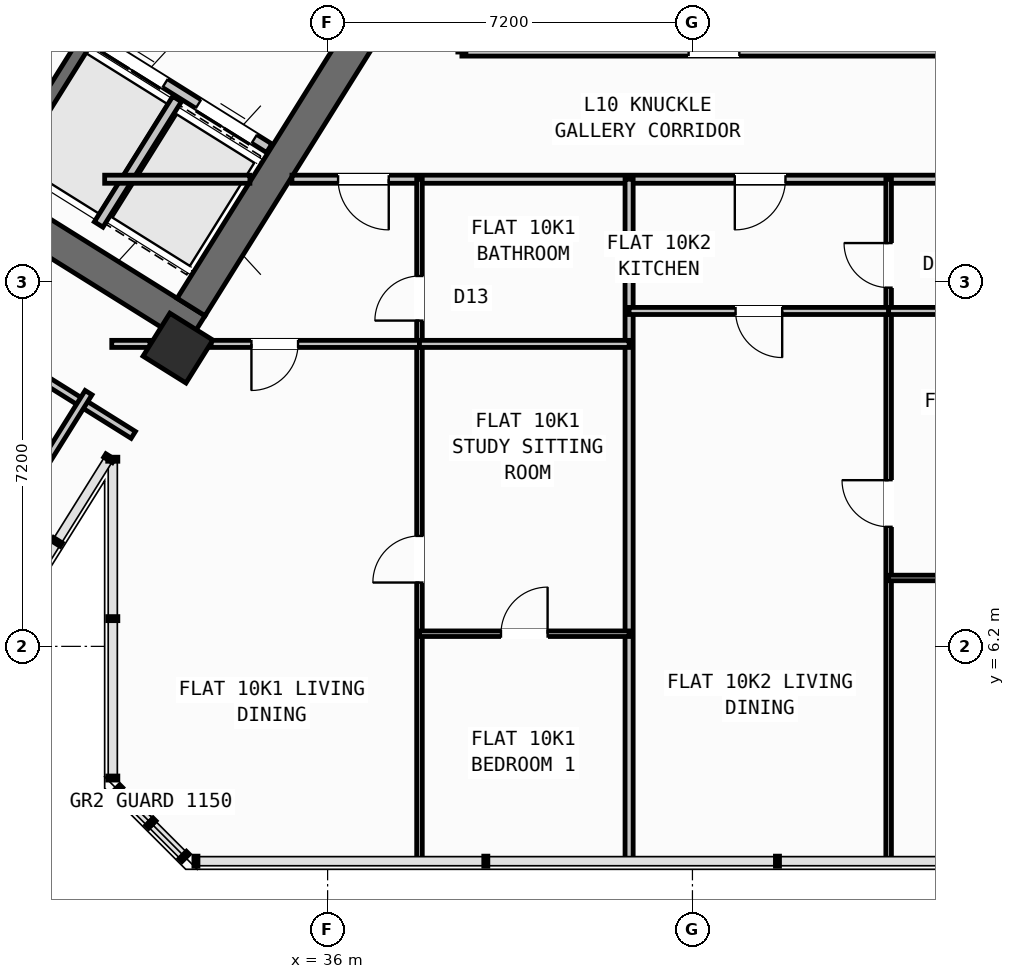
"""IFC4 building model, lengths in metres.
Left out: names, types, materials, properties, quantities, classifications, styles, units other than length and angle.
Written with IfcOpenShell. Run it as: python <this file> out.ifc"""

import sys

from ifc_helpers import new_model, si_unit, direction, frame, frame_2d, origin, origin_2d, place, context, subcontext, project, spatial, rectangle, hollow_rectangle, extrude, source, transform, mapped, element, fill, save


model = new_model("IFC4")
c1 = context("Model", 3, precision=1e-05, world=origin(), true_north=direction((0.0, 1.0)))
c2 = subcontext(c1, "Body", "Model", "MODEL_VIEW")
j1 = project(units=[si_unit("LENGTHUNIT", "METRE"), si_unit("PLANEANGLEUNIT", "RADIAN")], contexts=[c1])
p1 = place(None, origin())
s1 = spatial("IfcSite", under=j1, at=p1, CompositionType="ELEMENT")
p2 = place(p1, origin())
s2 = spatial("IfcBuilding", under=s1, at=p2, CompositionType="ELEMENT")
p3 = place(p2, frame((0.0, 0.0, 42.0)))
s3 = spatial("IfcBuildingStorey", under=s2, at=p3, CompositionType="ELEMENT", Elevation=42.0)
p4 = place(p3, frame((33.409, 12.45, 0.0), z_axis=(0.0, 0.0, 1.0), x_axis=(-0.848051132073, 0.529914405721, 0.0)))
e1 = element("IfcWall", 1, at=p4, inside=s3, PredefinedType="SHEAR", context=c2, shape_type="SweptSolid", body=[
    extrude(rectangle(XDim=13.24, YDim=0.65, at=frame_2d((6.62, 0.0))), origin(), (0.0, 0.0, 1.0), 3.35),
])
p5 = place(p3, frame((36.683, 18.304, 0.0), z_axis=(0.0, 0.0, 1.0), x_axis=(-0.529899109053, -0.848060690178, 0.0)))
e2 = element("IfcWall", 2, at=p5, inside=s3, PredefinedType="SHEAR", context=c2, shape_type="SweptSolid", body=[
    extrude(rectangle(XDim=6.375, YDim=0.65, at=frame_2d((3.188, 0.0))), origin(), (0.0, 0.0, 1.0), 3.35),
])
m1 = source(origin(), c2, "Body", "SweptSolid", [
    extrude(hollow_rectangle(XDim=1.0, YDim=1.0, WallThickness=0.04, at=origin_2d()), origin(), (0.0, 0.0, 1.0), 3.6),
])
p6 = place(p3, frame((33.046, 12.087, 0.0), z_axis=(0.0, 0.0, 1.0), x_axis=(-0.848048096156, 0.529919264233, 0.0)))
e3 = element("IfcColumn", 3, at=p6, inside=s3, PredefinedType="COLUMN", context=c2, shape_type="MappedRepresentation", body=[
    mapped(m1, transform((0.0, 0.0, 0.0), scale=1.0)),
])
p7 = place(p3, frame((31.288, 18.256, 0.0), z_axis=(0.0, 0.0, 1.0), x_axis=(-0.529943379326, -0.848033026897, 0.0)))
e4 = element("IfcWall", 4, at=p7, inside=s3, PredefinedType="SHEAR", context=c2, shape_type="SweptSolid", body=[
    extrude(rectangle(XDim=3.16, YDim=0.26, at=frame_2d((1.58, 0.0))), origin(), (0.0, 0.0, 1.0), 3.35),
])
p8 = place(p3, frame((34.848, 16.031, 0.0), z_axis=(0.0, 0.0, 1.0), x_axis=(-0.848044042236, 0.529925751807, 0.0)))
e5 = element("IfcWall", 5, at=p8, inside=s3, PredefinedType="STANDARD", context=c2, shape_type="SweptSolid", body=[
    extrude(rectangle(XDim=4.198, YDim=0.2, at=frame_2d((2.099, 0.0))), origin(), (0.0, 0.0, 1.0), 3.34),
])
p9 = place(p8, frame((0.348, 0.0, 0.0)))
e6 = element("IfcOpeningElement", 6, at=p9, cuts=e5, PredefinedType="OPENING", context=c2, shape_type="SweptSolid", body=[
    extrude(rectangle(XDim=1.3, YDim=2.2, at=frame_2d((0.65, 1.1))), frame((0.0, 0.11, 0.0), z_axis=(0.0, -1.0, 0.0), x_axis=(1.0, 0.0, 0.0)), (0.0, 0.0, 1.0), 0.22),
])
p10 = place(p8, frame((2.423, 0.0, 0.0)))
e7 = element("IfcOpeningElement", 7, at=p10, cuts=e5, PredefinedType="OPENING", context=c2, shape_type="SweptSolid", body=[
    extrude(rectangle(XDim=1.45, YDim=2.25, at=frame_2d((0.725, 1.125))), frame((0.0, 0.11, 0.0), z_axis=(0.0, -1.0, 0.0), x_axis=(1.0, 0.0, 0.0)), (0.0, 0.0, 1.0), 0.22),
])
p11 = place(p3, frame((33.029, 17.003, 0.0), z_axis=(0.0, 0.0, 1.0), x_axis=(-0.529916267533, -0.848049968695, 0.0)))
e8 = element("IfcWall", 8, at=p11, inside=s3, PredefinedType="STANDARD", context=c2, shape_type="SweptSolid", body=[
    extrude(rectangle(XDim=2.92, YDim=0.2, at=frame_2d((1.46, 0.0))), origin(), (0.0, 0.0, 1.0), 3.34),
])
p12 = place(p3, frame((32.164, 10.374, 0.0), z_axis=(0.0, 0.0, 1.0), x_axis=(-0.848044107957, 0.529925646633, 0.0)))
e9 = element("IfcWall", 9, at=p12, inside=s3, PredefinedType="PARTITIONING", context=c2, shape_type="SweptSolid", body=[
    extrude(rectangle(XDim=15.57, YDim=0.16, at=frame_2d((7.785, 0.0))), origin(), (0.0, 0.0, 1.0), 3.34),
])
p13 = place(p12, frame((10.83, 0.0, 0.0)))
e10 = element("IfcOpeningElement", 10, at=p13, cuts=e9, PredefinedType="OPENING", context=c2, shape_type="SweptSolid", body=[
    extrude(rectangle(XDim=1.0, YDim=2.1, at=frame_2d((0.5, 1.05))), frame((0.0, 0.09, 0.0), z_axis=(0.0, -1.0, 0.0), x_axis=(1.0, 0.0, 0.0)), (0.0, 0.0, 1.0), 0.18),
])
p14 = place(p3, frame((31.282, 11.208, 0.0), z_axis=(0.0, 0.0, 1.0), x_axis=(-0.529938869374, -0.84803584519, 0.0)))
e11 = element("IfcWall", 11, at=p14, inside=s3, PredefinedType="PARTITIONING", context=c2, shape_type="SweptSolid", body=[
    extrude(rectangle(XDim=5.48, YDim=0.16, at=frame_2d((2.74, 0.0))), origin(), (0.0, 0.0, 1.0), 3.34),
])
p15 = place(p3, frame((31.6, 15.42, 0.0), z_axis=(0.0, 0.0, 1.0), x_axis=(1.0, 0.0, 0.0)))
e12 = element("IfcWall", 12, at=p15, inside=s3, PredefinedType="PARTITIONING", context=c2, shape_type="SweptSolid", body=[
    extrude(rectangle(XDim=2.866, YDim=0.16, at=frame_2d((1.433, 0.0))), origin(), (0.0, 0.0, 1.0), 3.34),
])
p16 = place(p3, frame((35.296, 15.42, 0.0), z_axis=(0.0, 0.0, 1.0), x_axis=(1.0, 0.0, 0.0)))
e13 = element("IfcWall", 13, at=p16, inside=s3, PredefinedType="PARTITIONING", context=c2, shape_type="SweptSolid", body=[
    extrude(rectangle(XDim=15.311, YDim=0.16, at=frame_2d((7.655, 0.0))), origin(), (0.0, 0.0, 1.0), 3.34),
])
p17 = place(p16, frame((0.91, 0.0, 0.0)))
e14 = element("IfcOpeningElement", 14, at=p17, cuts=e13, PredefinedType="OPENING", context=c2, shape_type="SweptSolid", body=[
    extrude(rectangle(XDim=1.0, YDim=2.1, at=frame_2d((0.5, 1.05))), frame((0.0, 0.09, 0.0), z_axis=(0.0, -1.0, 0.0), x_axis=(1.0, 0.0, 0.0)), (0.0, 0.0, 1.0), 0.18),
])
p18 = place(p16, frame((8.74, 0.0, 0.0)))
e15 = element("IfcOpeningElement", 15, at=p18, cuts=e13, PredefinedType="OPENING", context=c2, shape_type="SweptSolid", body=[
    extrude(rectangle(XDim=1.0, YDim=2.1, at=frame_2d((0.5, 1.05))), frame((0.0, 0.09, 0.0), z_axis=(0.0, -1.0, 0.0), x_axis=(1.0, 0.0, 0.0)), (0.0, 0.0, 1.0), 0.18),
])
p19 = place(p3, frame((38.65, 17.93, 0.0), z_axis=(0.0, 0.0, 1.0), x_axis=(1.0, 0.0, 0.0)))
e16 = element("IfcWall", 16, at=p19, inside=s3, PredefinedType="PARTITIONING", context=c2, shape_type="SweptSolid", body=[
    extrude(rectangle(XDim=9.95, YDim=0.16, at=frame_2d((4.975, 0.0))), origin(), (0.0, 0.0, 1.0), 3.34),
])
p20 = place(p19, frame((4.475, 0.0, 0.0)))
e17 = element("IfcOpeningElement", 17, at=p20, cuts=e16, PredefinedType="OPENING", context=c2, shape_type="SweptSolid", body=[
    extrude(rectangle(XDim=1.0, YDim=2.1, at=frame_2d((0.5, 1.05))), frame((0.0, 0.09, 0.0), z_axis=(0.0, -1.0, 0.0), x_axis=(1.0, 0.0, 0.0)), (0.0, 0.0, 1.0), 0.18),
])
p21 = place(p3, frame((41.95, 1.96, 0.0), z_axis=(0.0, 0.0, 1.0), x_axis=(0.0, 1.0, 0.0)))
e18 = element("IfcWall", 18, at=p21, inside=s3, PredefinedType="PARTITIONING", context=c2, shape_type="SweptSolid", body=[
    extrude(rectangle(XDim=13.46, YDim=0.16, at=frame_2d((6.73, 0.0))), origin(), (0.0, 0.0, 1.0), 3.34),
])
p22 = place(p3, frame((37.813, 1.96, 0.0), z_axis=(0.0, 0.0, 1.0), x_axis=(0.0, 1.0, 0.0)))
e19 = element("IfcWall", 19, at=p22, inside=s3, PredefinedType="PARTITIONING", context=c2, shape_type="SweptSolid", body=[
    extrude(rectangle(XDim=13.46, YDim=0.11, at=frame_2d((6.73, 0.0))), origin(), (0.0, 0.0, 1.0), 3.34),
])
p23 = place(p22, frame((5.5, 0.0, 0.0)))
e20 = element("IfcOpeningElement", 20, at=p23, cuts=e19, PredefinedType="OPENING", context=c2, shape_type="SweptSolid", body=[
    extrude(rectangle(XDim=0.92, YDim=2.08, at=frame_2d((0.46, 1.04))), frame((0.0, 0.065, 0.0), z_axis=(0.0, -1.0, 0.0), x_axis=(1.0, 0.0, 0.0)), (0.0, 0.0, 1.0), 0.13),
])
p24 = place(p22, frame((10.67, 0.0, 0.0)))
e21 = element("IfcOpeningElement", 21, at=p24, cuts=e19, PredefinedType="OPENING", context=c2, shape_type="SweptSolid", body=[
    extrude(rectangle(XDim=0.88, YDim=2.08, at=frame_2d((0.44, 1.04))), frame((0.0, 0.065, 0.0), z_axis=(0.0, -1.0, 0.0), x_axis=(1.0, 0.0, 0.0)), (0.0, 0.0, 1.0), 0.13),
])
p25 = place(p3, frame((31.74, 12.17, 0.0), z_axis=(0.0, 0.0, 1.0), x_axis=(1.0, 0.0, 0.0)))
e22 = element("IfcWall", 22, at=p25, inside=s3, PredefinedType="PLUMBINGWALL", context=c2, shape_type="SweptSolid", body=[
    extrude(rectangle(XDim=0.754, YDim=0.14, at=frame_2d((0.377, 0.0))), origin(), (0.0, 0.0, 1.0), 3.34),
])
p26 = place(p3, frame((33.702, 12.17, 0.0), z_axis=(0.0, 0.0, 1.0), x_axis=(1.0, 0.0, 0.0)))
e23 = element("IfcWall", 23, at=p26, inside=s3, PredefinedType="PLUMBINGWALL", context=c2, shape_type="SweptSolid", body=[
    extrude(rectangle(XDim=4.111, YDim=0.14, at=frame_2d((2.056, 0.0))), origin(), (0.0, 0.0, 1.0), 2.525),
])
p27 = place(p26, frame((0.795, 0.0, 0.0)))
e24 = element("IfcOpeningElement", 24, at=p27, cuts=e23, PredefinedType="OPENING", context=c2, shape_type="SweptSolid", body=[
    extrude(rectangle(XDim=0.92, YDim=2.08, at=frame_2d((0.46, 1.04))), frame((0.0, 0.08, 0.0), z_axis=(0.0, -1.0, 0.0), x_axis=(1.0, 0.0, 0.0)), (0.0, 0.0, 1.0), 0.16),
])
p28 = place(p3, frame((37.813, 12.17, 0.0), z_axis=(0.0, 0.0, 1.0), x_axis=(1.0, 0.0, 0.0)))
e25 = element("IfcWall", 25, at=p28, inside=s3, PredefinedType="PLUMBINGWALL", context=c2, shape_type="SweptSolid", body=[
    extrude(rectangle(XDim=4.137, YDim=0.14, at=frame_2d((2.068, 0.0))), origin(), (0.0, 0.0, 1.0), 2.525),
])
p29 = place(p3, frame((37.813, 6.45, 0.0), z_axis=(0.0, 0.0, 1.0), x_axis=(1.0, 0.0, 0.0)))
e26 = element("IfcWall", 26, at=p29, inside=s3, PredefinedType="PARTITIONING", context=c2, shape_type="SweptSolid", body=[
    extrude(rectangle(XDim=4.137, YDim=0.11, at=frame_2d((2.068, 0.0))), origin(), (0.0, 0.0, 1.0), 3.34),
])
p30 = place(p29, frame((1.608, 0.0, 0.0)))
e27 = element("IfcOpeningElement", 27, at=p30, cuts=e26, PredefinedType="OPENING", context=c2, shape_type="SweptSolid", body=[
    extrude(rectangle(XDim=0.92, YDim=2.08, at=frame_2d((0.46, 1.04))), frame((0.0, 0.065, 0.0), z_axis=(0.0, -1.0, 0.0), x_axis=(1.0, 0.0, 0.0)), (0.0, 0.0, 1.0), 0.13),
])
p31 = place(p3, frame((47.072, 1.96, 0.0), z_axis=(0.0, 0.0, 1.0), x_axis=(0.0, 1.0, 0.0)))
e28 = element("IfcWall", 28, at=p31, inside=s3, PredefinedType="PARTITIONING", context=c2, shape_type="SweptSolid", body=[
    extrude(rectangle(XDim=13.46, YDim=0.11, at=frame_2d((6.73, 0.0))), origin(), (0.0, 0.0, 1.0), 3.34),
])
p32 = place(p31, frame((6.6, 0.0, 0.0)))
e29 = element("IfcOpeningElement", 29, at=p32, cuts=e28, PredefinedType="OPENING", context=c2, shape_type="SweptSolid", body=[
    extrude(rectangle(XDim=0.92, YDim=2.08, at=frame_2d((0.46, 1.04))), frame((0.0, 0.065, 0.0), z_axis=(0.0, -1.0, 0.0), x_axis=(1.0, 0.0, 0.0)), (0.0, 0.0, 1.0), 0.13),
])
p33 = place(p31, frame((11.32, 0.0, 0.0)))
e30 = element("IfcOpeningElement", 30, at=p33, cuts=e28, PredefinedType="OPENING", context=c2, shape_type="SweptSolid", body=[
    extrude(rectangle(XDim=0.88, YDim=2.08, at=frame_2d((0.44, 1.04))), frame((0.0, 0.065, 0.0), z_axis=(0.0, -1.0, 0.0), x_axis=(1.0, 0.0, 0.0)), (0.0, 0.0, 1.0), 0.13),
])
p34 = place(p3, frame((41.95, 12.82, 0.0), z_axis=(0.0, 0.0, 1.0), x_axis=(1.0, 0.0, 0.0)))
e31 = element("IfcWall", 31, at=p34, inside=s3, PredefinedType="PLUMBINGWALL", context=c2, shape_type="SweptSolid", body=[
    extrude(rectangle(XDim=5.122, YDim=0.14, at=frame_2d((2.561, 0.0))), origin(), (0.0, 0.0, 1.0), 2.525),
])
p35 = place(p34, frame((2.101, 0.0, 0.0)))
e32 = element("IfcOpeningElement", 32, at=p35, cuts=e31, PredefinedType="OPENING", context=c2, shape_type="SweptSolid", body=[
    extrude(rectangle(XDim=0.92, YDim=2.08, at=frame_2d((0.46, 1.04))), frame((0.0, 0.08, 0.0), z_axis=(0.0, -1.0, 0.0), x_axis=(1.0, 0.0, 0.0)), (0.0, 0.0, 1.0), 0.16),
])
p36 = place(p3, frame((47.072, 12.82, 0.0), z_axis=(0.0, 0.0, 1.0), x_axis=(1.0, 0.0, 0.0)))
e33 = element("IfcWall", 33, at=p36, inside=s3, PredefinedType="PLUMBINGWALL", context=c2, shape_type="SweptSolid", body=[
    extrude(rectangle(XDim=4.967, YDim=0.14, at=frame_2d((2.483, 0.0))), origin(), (0.0, 0.0, 1.0), 2.525),
])
p37 = place(p3, frame((47.072, 7.55, 0.0), z_axis=(0.0, 0.0, 1.0), x_axis=(1.0, 0.0, 0.0)))
e34 = element("IfcWall", 34, at=p37, inside=s3, PredefinedType="PARTITIONING", context=c2, shape_type="SweptSolid", body=[
    extrude(rectangle(XDim=5.188, YDim=0.11, at=frame_2d((2.594, 0.0))), origin(), (0.0, 0.0, 1.0), 3.34),
])
p38 = place(p37, frame((1.904, 0.0, 0.0)))
e35 = element("IfcOpeningElement", 35, at=p38, cuts=e34, PredefinedType="OPENING", context=c2, shape_type="SweptSolid", body=[
    extrude(rectangle(XDim=0.92, YDim=2.08, at=frame_2d((0.46, 1.04))), frame((0.0, 0.065, 0.0), z_axis=(0.0, -1.0, 0.0), x_axis=(1.0, 0.0, 0.0)), (0.0, 0.0, 1.0), 0.13),
])
m2 = source(origin(), c2, "Body", "SweptSolid", [
    extrude(rectangle(XDim=1.3, YDim=2.2, at=frame_2d((0.65, 1.1))), frame((0.0, 0.025, 0.0), z_axis=(0.0, -1.0, 0.0), x_axis=(1.0, 0.0, 0.0)), (0.0, 0.0, 1.0), 0.05),
])
p39 = place(p9, origin())
e36 = element("IfcDoor", 36, at=p39, inside=s3, OperationType="DOUBLE_DOOR_SLIDING", PredefinedType="DOOR", context=c2, shape_type="MappedRepresentation", body=[
    mapped(m2, transform((0.0, 0.0, 0.0), scale=1.0)),
])
fill(e6, e36)
m3 = source(origin(), c2, "Body", "SweptSolid", [
    extrude(rectangle(XDim=1.45, YDim=2.25, at=frame_2d((0.725, 1.125))), frame((0.0, 0.025, 0.0), z_axis=(0.0, -1.0, 0.0), x_axis=(1.0, 0.0, 0.0)), (0.0, 0.0, 1.0), 0.05),
])
p40 = place(p10, origin())
e37 = element("IfcDoor", 37, at=p40, inside=s3, OperationType="DOUBLE_DOOR_SLIDING", PredefinedType="DOOR", context=c2, shape_type="MappedRepresentation", body=[
    mapped(m3, transform((0.0, 0.0, 0.0), scale=1.0)),
])
fill(e7, e37)
m4 = source(origin(), c2, "Body", "SweptSolid", [
    extrude(rectangle(XDim=1.0, YDim=2.1, at=frame_2d((0.5, 1.05))), frame((0.0, 0.025, 0.0), z_axis=(0.0, -1.0, 0.0), x_axis=(1.0, 0.0, 0.0)), (0.0, 0.0, 1.0), 0.05),
])
p41 = place(p20, origin())
e38 = element("IfcDoor", 38, at=p41, inside=s3, OperationType="SINGLE_SWING_RIGHT", PredefinedType="DOOR", context=c2, shape_type="MappedRepresentation", body=[
    mapped(m4, transform((0.0, 0.0, 0.0), scale=1.0)),
])
fill(e17, e38)
m5 = source(origin(), c2, "Body", "SweptSolid", [
    extrude(rectangle(XDim=0.92, YDim=2.08, at=frame_2d((0.46, 1.04))), frame((0.0, 0.025, 0.0), z_axis=(0.0, -1.0, 0.0), x_axis=(1.0, 0.0, 0.0)), (0.0, 0.0, 1.0), 0.05),
])
p42 = place(p23, origin())
e39 = element("IfcDoor", 39, at=p42, inside=s3, OperationType="SINGLE_SWING_LEFT", PredefinedType="DOOR", context=c2, shape_type="MappedRepresentation", body=[
    mapped(m5, transform((0.0, 0.0, 0.0), scale=1.0)),
])
fill(e20, e39)
p43 = place(p30, origin())
e40 = element("IfcDoor", 40, at=p43, inside=s3, OperationType="SINGLE_SWING_RIGHT", PredefinedType="DOOR", context=c2, shape_type="MappedRepresentation", body=[
    mapped(m5, transform((0.0, 0.0, 0.0), scale=1.0)),
])
fill(e27, e40)
p44 = place(p17, frame((1.0, 0.0, 0.0), z_axis=(0.0, 0.0, 1.0), x_axis=(-1.0, 0.0, 0.0)))
e41 = element("IfcDoor", 41, at=p44, inside=s3, OperationType="SINGLE_SWING_LEFT", PredefinedType="DOOR", context=c2, shape_type="MappedRepresentation", body=[
    mapped(m4, transform((0.0, 0.0, 0.0), scale=1.0)),
])
fill(e14, e41)
p45 = place(p27, frame((0.92, 0.0, 0.0), z_axis=(0.0, 0.0, 1.0), x_axis=(-1.0, 0.0, 0.0)))
e42 = element("IfcDoor", 42, at=p45, inside=s3, OperationType="SINGLE_SWING_RIGHT", PredefinedType="DOOR", context=c2, shape_type="MappedRepresentation", body=[
    mapped(m5, transform((0.0, 0.0, 0.0), scale=1.0)),
])
fill(e24, e42)
m6 = source(origin(), c2, "Body", "SweptSolid", [
    extrude(rectangle(XDim=0.88, YDim=2.08, at=frame_2d((0.44, 1.04))), frame((0.0, 0.025, 0.0), z_axis=(0.0, -1.0, 0.0), x_axis=(1.0, 0.0, 0.0)), (0.0, 0.0, 1.0), 0.05),
])
p46 = place(p24, origin())
e43 = element("IfcDoor", 43, at=p46, inside=s3, OperationType="SINGLE_SWING_LEFT", PredefinedType="DOOR", context=c2, shape_type="MappedRepresentation", body=[
    mapped(m6, transform((0.0, 0.0, 0.0), scale=1.0)),
])
fill(e21, e43)
p47 = place(p32, origin())
e44 = element("IfcDoor", 44, at=p47, inside=s3, OperationType="SINGLE_SWING_RIGHT", PredefinedType="DOOR", context=c2, shape_type="MappedRepresentation", body=[
    mapped(m5, transform((0.0, 0.0, 0.0), scale=1.0)),
])
fill(e29, e44)
p48 = place(p18, frame((1.0, 0.0, 0.0), z_axis=(0.0, 0.0, 1.0), x_axis=(-1.0, 0.0, 0.0)))
e45 = element("IfcDoor", 45, at=p48, inside=s3, OperationType="SINGLE_SWING_RIGHT", PredefinedType="DOOR", context=c2, shape_type="MappedRepresentation", body=[
    mapped(m4, transform((0.0, 0.0, 0.0), scale=1.0)),
])
fill(e15, e45)
p49 = place(p35, frame((0.92, 0.0, 0.0), z_axis=(0.0, 0.0, 1.0), x_axis=(-1.0, 0.0, 0.0)))
e46 = element("IfcDoor", 46, at=p49, inside=s3, OperationType="SINGLE_SWING_LEFT", PredefinedType="DOOR", context=c2, shape_type="MappedRepresentation", body=[
    mapped(m5, transform((0.0, 0.0, 0.0), scale=1.0)),
])
fill(e32, e46)
p50 = place(p33, origin())
e47 = element("IfcDoor", 47, at=p50, inside=s3, OperationType="SINGLE_SWING_RIGHT", PredefinedType="DOOR", context=c2, shape_type="MappedRepresentation", body=[
    mapped(m6, transform((0.0, 0.0, 0.0), scale=1.0)),
])
fill(e30, e47)
save(model, sys.argv[1])
